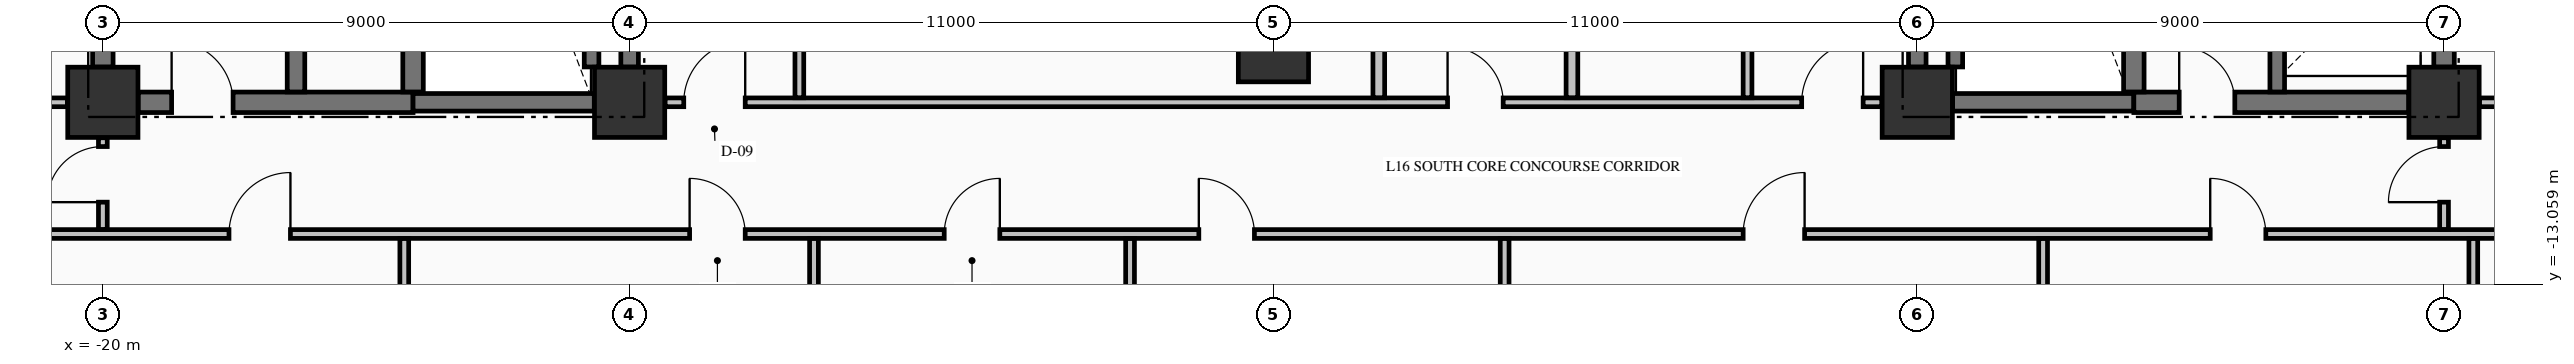
"""IFC4 building model, lengths in metres.
Left out: names, types, materials, properties, quantities, classifications, styles, units other than length and angle.
Written with IfcOpenShell. Run it as: python <this file> out.ifc"""

import sys

from ifc_helpers import new_model, si_unit, direction, frame, frame_2d, origin, origin_2d, place, context, subcontext, project, spatial, rectangle, extrude, element, fill, save


model = new_model("IFC4")
c1 = context("Model", 3, precision=1e-05, world=origin(), true_north=direction((0.0, 1.0)))
c2 = subcontext(c1, "Body", "Model", "MODEL_VIEW")
j1 = project(units=[si_unit("LENGTHUNIT", "METRE"), si_unit("PLANEANGLEUNIT", "RADIAN")], contexts=[c1])
p1 = place(None, origin())
s1 = spatial("IfcSite", under=j1, at=p1, CompositionType="ELEMENT")
p2 = place(p1, origin())
s2 = spatial("IfcBuilding", under=s1, at=p2, CompositionType="ELEMENT")
p3 = place(p2, frame((0.0, 0.0, 67.9)))
s3 = spatial("IfcBuildingStorey", under=s2, at=p3, CompositionType="ELEMENT", Elevation=67.9)
for number, where, z_axis, x_axis in (
    (1, (-20.0, -9.95, -0.25), (0.0, 0.0, 1.0), (1.0, 0.0, 0.0)),
    (2, (-11.0, -9.95, -0.25), (0.0, 0.0, 1.0), (1.0, 0.0, 0.0)),
    (3, (11.0, -9.95, -0.25), (0.0, 0.0, 1.0), (1.0, 0.0, 0.0)),
    (4, (20.0, -9.95, -0.25), (0.0, 0.0, 1.0), (1.0, 0.0, 0.0)),
    (5, (0.0, -9.0, -0.25), (0.0, 0.0, 1.0), (1.0, 0.0, 0.0)),
):
    element("IfcColumn", number, at=place(p3, frame(where, z_axis=z_axis, x_axis=x_axis)), inside=s3, PredefinedType="COLUMN", context=c2, shape_type="SweptSolid", body=[
        extrude(rectangle(XDim=1.2, YDim=1.2, at=origin_2d()), origin(), (0.0, 0.0, 1.0), 3.495),
    ])
p4 = place(p3, frame((-19.396, -9.95, 0.0), z_axis=(0.0, 0.0, 1.0), x_axis=(1.0, 0.0, 0.0)))
e6 = element("IfcWall", 6, at=p4, inside=s3, PredefinedType="SHEAR", context=c2, shape_type="SweptSolid", body=[
    extrude(rectangle(XDim=4.696, YDim=0.35, at=frame_2d((2.348, 0.0))), origin(), (0.0, 0.0, 1.0), 3.245),
])
p5 = place(p4, frame((0.571, 0.0, 0.0)))
e7 = element("IfcOpeningElement", 7, at=p5, cuts=e6, PredefinedType="OPENING", context=c2, shape_type="SweptSolid", body=[
    extrude(rectangle(XDim=1.05, YDim=2.15, at=frame_2d((0.525, 1.075))), frame((0.0, 0.185, 0.0), z_axis=(0.0, -1.0, 0.0), x_axis=(1.0, 0.0, 0.0)), (0.0, 0.0, 1.0), 0.37),
])
for number, where, z_axis, x_axis in (
    (8, (-14.7, -9.95, 0.0), (0.0, 0.0, 1.0), (1.0, 0.0, 0.0)),
    (9, (11.604, -9.95, 0.0), (0.0, 0.0, 1.0), (1.0, 0.0, 0.0)),
):
    element("IfcWall", number, at=place(p3, frame(where, z_axis=z_axis, x_axis=x_axis)), inside=s3, PredefinedType="SHEAR", context=c2, shape_type="SweptSolid", body=[
        extrude(rectangle(XDim=3.096, YDim=0.3, at=frame_2d((1.548, 0.0))), origin(), (0.0, 0.0, 1.0), 3.245),
    ])
p6 = place(p3, frame((14.7, -9.95, 0.0), z_axis=(0.0, 0.0, 1.0), x_axis=(1.0, 0.0, 0.0)))
e10 = element("IfcWall", 10, at=p6, inside=s3, PredefinedType="SHEAR", context=c2, shape_type="SweptSolid", body=[
    extrude(rectangle(XDim=4.696, YDim=0.35, at=frame_2d((2.348, 0.0))), origin(), (0.0, 0.0, 1.0), 3.245),
])
p7 = place(p6, frame((0.775, 0.0, 0.0)))
e11 = element("IfcOpeningElement", 11, at=p7, cuts=e10, PredefinedType="OPENING", context=c2, shape_type="SweptSolid", body=[
    extrude(rectangle(XDim=0.95, YDim=2.15, at=frame_2d((0.475, 1.075))), frame((0.0, 0.185, 0.0), z_axis=(0.0, -1.0, 0.0), x_axis=(1.0, 0.0, 0.0)), (0.0, 0.0, 1.0), 0.37),
])
p8 = place(p3, frame((-28.835, -12.2, 0.0), z_axis=(0.0, 0.0, 1.0), x_axis=(1.0, 0.0, 0.0)))
e12 = element("IfcWall", 12, at=p8, inside=s3, PredefinedType="PARTITIONING", context=c2, shape_type="SweptSolid", body=[
    extrude(rectangle(XDim=52.67, YDim=0.15, at=frame_2d((26.335, 0.0))), origin(), (0.0, 0.0, 1.0), 3.245),
])
p9 = place(p8, frame((10.99, 0.0, 0.0)))
e13 = element("IfcOpeningElement", 13, at=p9, cuts=e12, PredefinedType="OPENING", context=c2, shape_type="SweptSolid", body=[
    extrude(rectangle(XDim=1.05, YDim=2.15, at=frame_2d((0.525, 1.075))), frame((0.0, 0.085, 0.0), z_axis=(0.0, -1.0, 0.0), x_axis=(1.0, 0.0, 0.0)), (0.0, 0.0, 1.0), 0.17),
])
p10 = place(p8, frame((18.86, 0.0, 0.0)))
e14 = element("IfcOpeningElement", 14, at=p10, cuts=e12, PredefinedType="OPENING", context=c2, shape_type="SweptSolid", body=[
    extrude(rectangle(XDim=0.95, YDim=2.15, at=frame_2d((0.475, 1.075))), frame((0.0, 0.085, 0.0), z_axis=(0.0, -1.0, 0.0), x_axis=(1.0, 0.0, 0.0)), (0.0, 0.0, 1.0), 0.17),
])
p11 = place(p8, frame((23.21, 0.0, 0.0)))
e15 = element("IfcOpeningElement", 15, at=p11, cuts=e12, PredefinedType="OPENING", context=c2, shape_type="SweptSolid", body=[
    extrude(rectangle(XDim=0.95, YDim=2.15, at=frame_2d((0.475, 1.075))), frame((0.0, 0.085, 0.0), z_axis=(0.0, -1.0, 0.0), x_axis=(1.0, 0.0, 0.0)), (0.0, 0.0, 1.0), 0.17),
])
p12 = place(p8, frame((27.56, 0.0, 0.0)))
e16 = element("IfcOpeningElement", 16, at=p12, cuts=e12, PredefinedType="OPENING", context=c2, shape_type="SweptSolid", body=[
    extrude(rectangle(XDim=0.95, YDim=2.15, at=frame_2d((0.475, 1.075))), frame((0.0, 0.085, 0.0), z_axis=(0.0, -1.0, 0.0), x_axis=(1.0, 0.0, 0.0)), (0.0, 0.0, 1.0), 0.17),
])
p13 = place(p8, frame((36.86, 0.0, 0.0)))
e17 = element("IfcOpeningElement", 17, at=p13, cuts=e12, PredefinedType="OPENING", context=c2, shape_type="SweptSolid", body=[
    extrude(rectangle(XDim=1.05, YDim=2.15, at=frame_2d((0.525, 1.075))), frame((0.0, 0.085, 0.0), z_axis=(0.0, -1.0, 0.0), x_axis=(1.0, 0.0, 0.0)), (0.0, 0.0, 1.0), 0.17),
])
p14 = place(p8, frame((44.84, 0.0, 0.0)))
e18 = element("IfcOpeningElement", 18, at=p14, cuts=e12, PredefinedType="OPENING", context=c2, shape_type="SweptSolid", body=[
    extrude(rectangle(XDim=0.95, YDim=2.15, at=frame_2d((0.475, 1.075))), frame((0.0, 0.085, 0.0), z_axis=(0.0, -1.0, 0.0), x_axis=(1.0, 0.0, 0.0)), (0.0, 0.0, 1.0), 0.17),
])
p15 = place(p3, frame((-28.835, -9.95, 0.0), z_axis=(0.0, 0.0, 1.0), x_axis=(1.0, 0.0, 0.0)))
e19 = element("IfcWall", 19, at=p15, inside=s3, PredefinedType="PARTITIONING", context=c2, shape_type="SweptSolid", body=[
    extrude(rectangle(XDim=8.229, YDim=0.15, at=frame_2d((4.115, 0.0))), origin(), (0.0, 0.0, 1.0), 3.245),
])
p16 = place(p15, frame((3.835, 0.0, 0.0)))
e20 = element("IfcOpeningElement", 20, at=p16, cuts=e19, PredefinedType="OPENING", context=c2, shape_type="SweptSolid", body=[
    extrude(rectangle(XDim=1.0, YDim=2.15, at=frame_2d((0.5, 1.075))), frame((0.0, 0.085, 0.0), z_axis=(0.0, -1.0, 0.0), x_axis=(1.0, 0.0, 0.0)), (0.0, 0.0, 1.0), 0.17),
])
p17 = place(p3, frame((-10.394, -9.95, 0.0), z_axis=(0.0, 0.0, 1.0), x_axis=(1.0, 0.0, 0.0)))
e21 = element("IfcWall", 21, at=p17, inside=s3, PredefinedType="PARTITIONING", context=c2, shape_type="SweptSolid", body=[
    extrude(rectangle(XDim=20.788, YDim=0.15, at=frame_2d((10.394, 0.0))), origin(), (0.0, 0.0, 1.0), 3.245),
])
p18 = place(p17, frame((0.319, 0.0, 0.0)))
e22 = element("IfcOpeningElement", 22, at=p18, cuts=e21, PredefinedType="OPENING", context=c2, shape_type="SweptSolid", body=[
    extrude(rectangle(XDim=1.05, YDim=2.15, at=frame_2d((0.525, 1.075))), frame((0.0, 0.085, 0.0), z_axis=(0.0, -1.0, 0.0), x_axis=(1.0, 0.0, 0.0)), (0.0, 0.0, 1.0), 0.17),
])
p19 = place(p17, frame((19.419, 0.0, 0.0)))
e23 = element("IfcOpeningElement", 23, at=p19, cuts=e21, PredefinedType="OPENING", context=c2, shape_type="SweptSolid", body=[
    extrude(rectangle(XDim=1.05, YDim=2.15, at=frame_2d((0.525, 1.075))), frame((0.0, 0.085, 0.0), z_axis=(0.0, -1.0, 0.0), x_axis=(1.0, 0.0, 0.0)), (0.0, 0.0, 1.0), 0.17),
])
p20 = place(p17, frame((13.369, 0.0, 0.0)))
e24 = element("IfcOpeningElement", 24, at=p20, cuts=e21, PredefinedType="OPENING", context=c2, shape_type="SweptSolid", body=[
    extrude(rectangle(XDim=0.95, YDim=2.15, at=frame_2d((0.475, 1.075))), frame((0.0, 0.085, 0.0), z_axis=(0.0, -1.0, 0.0), x_axis=(1.0, 0.0, 0.0)), (0.0, 0.0, 1.0), 0.17),
])
p21 = place(p3, frame((20.606, -9.95, 0.0), z_axis=(0.0, 0.0, 1.0), x_axis=(1.0, 0.0, 0.0)))
e25 = element("IfcWall", 25, at=p21, inside=s3, PredefinedType="PARTITIONING", context=c2, shape_type="SweptSolid", body=[
    extrude(rectangle(XDim=3.229, YDim=0.15, at=frame_2d((1.615, 0.0))), origin(), (0.0, 0.0, 1.0), 3.245),
])
p22 = place(p21, frame((0.919, 0.0, 0.0)))
e26 = element("IfcOpeningElement", 26, at=p22, cuts=e25, PredefinedType="OPENING", context=c2, shape_type="SweptSolid", body=[
    extrude(rectangle(XDim=0.95, YDim=2.15, at=frame_2d((0.475, 1.075))), frame((0.0, 0.085, 0.0), z_axis=(0.0, -1.0, 0.0), x_axis=(1.0, 0.0, 0.0)), (0.0, 0.0, 1.0), 0.17),
])
p23 = place(p3, frame((-20.0, -9.346, 0.0), z_axis=(0.0, 0.0, 1.0), x_axis=(0.0, 1.0, 0.0)))
e27 = element("IfcWall", 27, at=p23, inside=s3, PredefinedType="SHEAR", context=c2, shape_type="SweptSolid", body=[
    extrude(rectangle(XDim=8.742, YDim=0.35, at=frame_2d((4.371, 0.0))), origin(), (0.0, 0.0, 1.0), 3.245),
])
p24 = place(p3, frame((-16.7, -9.773, 0.0), z_axis=(0.0, 0.0, 1.0), x_axis=(0.0, 1.0, 0.0)))
e28 = element("IfcWall", 28, at=p24, inside=s3, PredefinedType="SHEAR", context=c2, shape_type="SweptSolid", body=[
    extrude(rectangle(XDim=9.371, YDim=0.3, at=frame_2d((4.686, 0.0))), origin(), (0.0, 0.0, 1.0), 3.245),
])
p25 = place(p3, frame((-14.7, -9.773, 0.0), z_axis=(0.0, 0.0, 1.0), x_axis=(0.0, 1.0, 0.0)))
e29 = element("IfcWall", 29, at=p25, inside=s3, PredefinedType="SHEAR", context=c2, shape_type="SweptSolid", body=[
    extrude(rectangle(XDim=9.371, YDim=0.35, at=frame_2d((4.686, 0.0))), origin(), (0.0, 0.0, 1.0), 3.245),
])
p26 = place(p3, frame((-11.65, -9.346, 0.0), z_axis=(0.0, 0.0, 1.0), x_axis=(0.0, 1.0, 0.0)))
e30 = element("IfcWall", 30, at=p26, inside=s3, PredefinedType="SOLIDWALL", context=c2, shape_type="SweptSolid", body=[
    extrude(rectangle(XDim=8.742, YDim=0.25, at=frame_2d((4.371, 0.0))), origin(), (0.0, 0.0, 1.0), 3.245),
])
for number, where, z_axis, x_axis in (
    (31, (-11.0, -9.346, 0.0), (0.0, 0.0, 1.0), (0.0, 1.0, 0.0)),
    (32, (11.0, -9.346, 0.0), (0.0, 0.0, 1.0), (0.0, 1.0, 0.0)),
):
    element("IfcWall", number, at=place(p3, frame(where, z_axis=z_axis, x_axis=x_axis)), inside=s3, PredefinedType="SHEAR", context=c2, shape_type="SweptSolid", body=[
        extrude(rectangle(XDim=8.742, YDim=0.3, at=frame_2d((4.371, 0.0))), origin(), (0.0, 0.0, 1.0), 3.245),
    ])
p27 = place(p3, frame((11.65, -9.346, 0.0), z_axis=(0.0, 0.0, 1.0), x_axis=(0.0, 1.0, 0.0)))
e33 = element("IfcWall", 33, at=p27, inside=s3, PredefinedType="SOLIDWALL", context=c2, shape_type="SweptSolid", body=[
    extrude(rectangle(XDim=8.742, YDim=0.25, at=frame_2d((4.371, 0.0))), origin(), (0.0, 0.0, 1.0), 3.245),
])
p28 = place(p3, frame((14.7, -9.773, 0.0), z_axis=(0.0, 0.0, 1.0), x_axis=(0.0, 1.0, 0.0)))
e34 = element("IfcWall", 34, at=p28, inside=s3, PredefinedType="SHEAR", context=c2, shape_type="SweptSolid", body=[
    extrude(rectangle(XDim=9.371, YDim=0.35, at=frame_2d((4.686, 0.0))), origin(), (0.0, 0.0, 1.0), 3.245),
])
p29 = place(p3, frame((17.15, -9.773, 0.0), z_axis=(0.0, 0.0, 1.0), x_axis=(0.0, 1.0, 0.0)))
e35 = element("IfcWall", 35, at=p29, inside=s3, PredefinedType="SOLIDWALL", context=c2, shape_type="SweptSolid", body=[
    extrude(rectangle(XDim=2.596, YDim=0.25, at=frame_2d((1.298, 0.0))), origin(), (0.0, 0.0, 1.0), 3.245),
])
p30 = place(p3, frame((20.0, -9.346, 0.0), z_axis=(0.0, 0.0, 1.0), x_axis=(0.0, 1.0, 0.0)))
e36 = element("IfcWall", 36, at=p30, inside=s3, PredefinedType="SHEAR", context=c2, shape_type="SweptSolid", body=[
    extrude(rectangle(XDim=2.169, YDim=0.35, at=frame_2d((1.084, 0.0))), origin(), (0.0, 0.0, 1.0), 3.245),
])
p31 = place(p3, frame((-20.0, -12.122, 0.0), z_axis=(0.0, 0.0, 1.0), x_axis=(0.0, 1.0, 0.0)))
e37 = element("IfcWall", 37, at=p31, inside=s3, PredefinedType="PARTITIONING", context=c2, shape_type="SweptSolid", body=[
    extrude(rectangle(XDim=1.566, YDim=0.15, at=frame_2d((0.783, 0.0))), origin(), (0.0, 0.0, 1.0), 2.585),
])
p32 = place(p31, frame((0.466, 0.0, 0.0)))
e38 = element("IfcOpeningElement", 38, at=p32, cuts=e37, PredefinedType="OPENING", context=c2, shape_type="SweptSolid", body=[
    extrude(rectangle(XDim=0.95, YDim=2.15, at=frame_2d((0.475, 1.075))), frame((0.0, 0.085, 0.0), z_axis=(0.0, -1.0, 0.0), x_axis=(1.0, 0.0, 0.0)), (0.0, 0.0, 1.0), 0.17),
])
p33 = place(p3, frame((-14.85, -26.335, 0.0), z_axis=(0.0, 0.0, 1.0), x_axis=(0.0, 1.0, 0.0)))
e39 = element("IfcWall", 39, at=p33, inside=s3, PredefinedType="PARTITIONING", context=c2, shape_type="SweptSolid", body=[
    extrude(rectangle(XDim=14.057, YDim=0.15, at=frame_2d((7.028, 0.0))), origin(), (0.0, 0.0, 1.0), 3.245),
])
p34 = place(p3, frame((-8.1, -9.872, 0.0), z_axis=(0.0, 0.0, 1.0), x_axis=(0.0, 1.0, 0.0)))
e40 = element("IfcWall", 40, at=p34, inside=s3, PredefinedType="PARTITIONING", context=c2, shape_type="SweptSolid", body=[
    extrude(rectangle(XDim=5.769, YDim=0.15, at=frame_2d((2.885, 0.0))), origin(), (0.0, 0.0, 1.0), 3.245),
])
p35 = place(p34, frame((2.427, 0.0, 0.0)))
e41 = element("IfcOpeningElement", 41, at=p35, cuts=e40, PredefinedType="OPENING", context=c2, shape_type="SweptSolid", body=[
    extrude(rectangle(XDim=0.95, YDim=2.15, at=frame_2d((0.475, 1.075))), frame((0.0, 0.085, 0.0), z_axis=(0.0, -1.0, 0.0), x_axis=(1.0, 0.0, 0.0)), (0.0, 0.0, 1.0), 0.17),
])
for number, where, z_axis, x_axis in (
    (42, (-7.85, -26.335, 0.0), (0.0, 0.0, 1.0), (0.0, 1.0, 0.0)),
    (43, (-2.45, -26.335, 0.0), (0.0, 0.0, 1.0), (0.0, 1.0, 0.0)),
):
    element("IfcWall", number, at=place(p3, frame(where, z_axis=z_axis, x_axis=x_axis)), inside=s3, PredefinedType="PARTITIONING", context=c2, shape_type="SweptSolid", body=[
        extrude(rectangle(XDim=14.057, YDim=0.15, at=frame_2d((7.028, 0.0))), origin(), (0.0, 0.0, 1.0), 3.245),
    ])
p36 = place(p3, frame((1.8, -9.872, 0.0), z_axis=(0.0, 0.0, 1.0), x_axis=(0.0, 1.0, 0.0)))
e44 = element("IfcWall", 44, at=p36, inside=s3, PredefinedType="PARTITIONING", context=c2, shape_type="SweptSolid", body=[
    extrude(rectangle(XDim=4.969, YDim=0.2, at=frame_2d((2.484, 0.0))), origin(), (0.0, 0.0, 1.0), 3.245),
])
p37 = place(p3, frame((3.95, -26.335, 0.0), z_axis=(0.0, 0.0, 1.0), x_axis=(0.0, 1.0, 0.0)))
e45 = element("IfcWall", 45, at=p37, inside=s3, PredefinedType="PARTITIONING", context=c2, shape_type="SweptSolid", body=[
    extrude(rectangle(XDim=14.057, YDim=0.15, at=frame_2d((7.028, 0.0))), origin(), (0.0, 0.0, 1.0), 3.245),
])
p38 = place(p3, frame((5.1, -9.872, 0.0), z_axis=(0.0, 0.0, 1.0), x_axis=(0.0, 1.0, 0.0)))
e46 = element("IfcWall", 46, at=p38, inside=s3, PredefinedType="PARTITIONING", context=c2, shape_type="SweptSolid", body=[
    extrude(rectangle(XDim=4.969, YDim=0.2, at=frame_2d((2.484, 0.0))), origin(), (0.0, 0.0, 1.0), 3.245),
])
p39 = place(p3, frame((8.1, -9.872, 0.0), z_axis=(0.0, 0.0, 1.0), x_axis=(0.0, 1.0, 0.0)))
e47 = element("IfcWall", 47, at=p39, inside=s3, PredefinedType="PARTITIONING", context=c2, shape_type="SweptSolid", body=[
    extrude(rectangle(XDim=4.969, YDim=0.15, at=frame_2d((2.484, 0.0))), origin(), (0.0, 0.0, 1.0), 3.245),
])
p40 = place(p39, frame((1.997, 0.0, 0.0)))
e48 = element("IfcOpeningElement", 48, at=p40, cuts=e47, PredefinedType="OPENING", context=c2, shape_type="SweptSolid", body=[
    extrude(rectangle(XDim=0.95, YDim=2.15, at=frame_2d((0.475, 1.075))), frame((0.0, 0.085, 0.0), z_axis=(0.0, -1.0, 0.0), x_axis=(1.0, 0.0, 0.0)), (0.0, 0.0, 1.0), 0.17),
])
p41 = place(p3, frame((13.15, -26.335, 0.0), z_axis=(0.0, 0.0, 1.0), x_axis=(0.0, 1.0, 0.0)))
e49 = element("IfcWall", 49, at=p41, inside=s3, PredefinedType="PARTITIONING", context=c2, shape_type="SweptSolid", body=[
    extrude(rectangle(XDim=14.057, YDim=0.15, at=frame_2d((7.028, 0.0))), origin(), (0.0, 0.0, 1.0), 3.245),
])
p42 = place(p3, frame((20.0, -12.122, 0.0), z_axis=(0.0, 0.0, 1.0), x_axis=(0.0, 1.0, 0.0)))
e50 = element("IfcWall", 50, at=p42, inside=s3, PredefinedType="PARTITIONING", context=c2, shape_type="SweptSolid", body=[
    extrude(rectangle(XDim=1.566, YDim=0.15, at=frame_2d((0.783, 0.0))), origin(), (0.0, 0.0, 1.0), 3.245),
])
p43 = place(p42, frame((0.466, 0.0, 0.0)))
e51 = element("IfcOpeningElement", 51, at=p43, cuts=e50, PredefinedType="OPENING", context=c2, shape_type="SweptSolid", body=[
    extrude(rectangle(XDim=0.95, YDim=2.15, at=frame_2d((0.475, 1.075))), frame((0.0, 0.085, 0.0), z_axis=(0.0, -1.0, 0.0), x_axis=(1.0, 0.0, 0.0)), (0.0, 0.0, 1.0), 0.17),
])
p44 = place(p3, frame((20.5, -22.294, 0.0), z_axis=(0.0, 0.0, 1.0), x_axis=(0.0, 1.0, 0.0)))
e52 = element("IfcWall", 52, at=p44, inside=s3, PredefinedType="PARTITIONING", context=c2, shape_type="SweptSolid", body=[
    extrude(rectangle(XDim=10.016, YDim=0.15, at=frame_2d((5.008, 0.0))), origin(), (0.0, 0.0, 1.0), 3.245),
])
p45 = place(p5, origin())
e53 = element("IfcDoor", 53, at=p45, inside=s3, OperationType="SINGLE_SWING_LEFT", PredefinedType="DOOR", context=c2, shape_type="SweptSolid", body=[
    extrude(rectangle(XDim=1.05, YDim=2.15, at=frame_2d((0.525, 1.075))), frame((0.0, 0.025, 0.0), z_axis=(0.0, -1.0, 0.0), x_axis=(1.0, 0.0, 0.0)), (0.0, 0.0, 1.0), 0.05),
])
fill(e7, e53)
p46 = place(p7, origin())
e54 = element("IfcDoor", 54, at=p46, inside=s3, OperationType="SINGLE_SWING_LEFT", PredefinedType="DOOR", context=c2, shape_type="SweptSolid", body=[
    extrude(rectangle(XDim=0.95, YDim=2.15, at=frame_2d((0.475, 1.075))), frame((0.0, 0.025, 0.0), z_axis=(0.0, -1.0, 0.0), x_axis=(1.0, 0.0, 0.0)), (0.0, 0.0, 1.0), 0.05),
])
fill(e11, e54)
p47 = place(p18, origin())
e55 = element("IfcDoor", 55, at=p47, inside=s3, OperationType="SINGLE_SWING_RIGHT", PredefinedType="DOOR", context=c2, shape_type="SweptSolid", body=[
    extrude(rectangle(XDim=1.05, YDim=2.15, at=frame_2d((0.525, 1.075))), frame((0.0, 0.025, 0.0), z_axis=(0.0, -1.0, 0.0), x_axis=(1.0, 0.0, 0.0)), (0.0, 0.0, 1.0), 0.05),
])
fill(e22, e55)
p48 = place(p19, origin())
e56 = element("IfcDoor", 56, at=p48, inside=s3, OperationType="SINGLE_SWING_RIGHT", PredefinedType="DOOR", context=c2, shape_type="SweptSolid", body=[
    extrude(rectangle(XDim=1.05, YDim=2.15, at=frame_2d((0.525, 1.075))), frame((0.0, 0.025, 0.0), z_axis=(0.0, -1.0, 0.0), x_axis=(1.0, 0.0, 0.0)), (0.0, 0.0, 1.0), 0.05),
])
fill(e23, e56)
p49 = place(p9, origin())
e57 = element("IfcDoor", 57, at=p49, inside=s3, OperationType="SINGLE_SWING_RIGHT", PredefinedType="DOOR", context=c2, shape_type="SweptSolid", body=[
    extrude(rectangle(XDim=1.05, YDim=2.15, at=frame_2d((0.525, 1.075))), frame((0.0, 0.025, 0.0), z_axis=(0.0, -1.0, 0.0), x_axis=(1.0, 0.0, 0.0)), (0.0, 0.0, 1.0), 0.05),
])
fill(e13, e57)
p50 = place(p10, origin())
e58 = element("IfcDoor", 58, at=p50, inside=s3, OperationType="SINGLE_SWING_LEFT", PredefinedType="DOOR", context=c2, shape_type="SweptSolid", body=[
    extrude(rectangle(XDim=0.95, YDim=2.15, at=frame_2d((0.475, 1.075))), frame((0.0, 0.025, 0.0), z_axis=(0.0, -1.0, 0.0), x_axis=(1.0, 0.0, 0.0)), (0.0, 0.0, 1.0), 0.05),
])
fill(e14, e58)
p51 = place(p11, origin())
e59 = element("IfcDoor", 59, at=p51, inside=s3, OperationType="SINGLE_SWING_RIGHT", PredefinedType="DOOR", context=c2, shape_type="SweptSolid", body=[
    extrude(rectangle(XDim=0.95, YDim=2.15, at=frame_2d((0.475, 1.075))), frame((0.0, 0.025, 0.0), z_axis=(0.0, -1.0, 0.0), x_axis=(1.0, 0.0, 0.0)), (0.0, 0.0, 1.0), 0.05),
])
fill(e15, e59)
p52 = place(p12, origin())
e60 = element("IfcDoor", 60, at=p52, inside=s3, OperationType="SINGLE_SWING_LEFT", PredefinedType="DOOR", context=c2, shape_type="SweptSolid", body=[
    extrude(rectangle(XDim=0.95, YDim=2.15, at=frame_2d((0.475, 1.075))), frame((0.0, 0.025, 0.0), z_axis=(0.0, -1.0, 0.0), x_axis=(1.0, 0.0, 0.0)), (0.0, 0.0, 1.0), 0.05),
])
fill(e16, e60)
p53 = place(p13, origin())
e61 = element("IfcDoor", 61, at=p53, inside=s3, OperationType="SINGLE_SWING_RIGHT", PredefinedType="DOOR", context=c2, shape_type="SweptSolid", body=[
    extrude(rectangle(XDim=1.05, YDim=2.15, at=frame_2d((0.525, 1.075))), frame((0.0, 0.025, 0.0), z_axis=(0.0, -1.0, 0.0), x_axis=(1.0, 0.0, 0.0)), (0.0, 0.0, 1.0), 0.05),
])
fill(e17, e61)
p54 = place(p14, origin())
e62 = element("IfcDoor", 62, at=p54, inside=s3, OperationType="SINGLE_SWING_LEFT", PredefinedType="DOOR", context=c2, shape_type="SweptSolid", body=[
    extrude(rectangle(XDim=0.95, YDim=2.15, at=frame_2d((0.475, 1.075))), frame((0.0, 0.025, 0.0), z_axis=(0.0, -1.0, 0.0), x_axis=(1.0, 0.0, 0.0)), (0.0, 0.0, 1.0), 0.05),
])
fill(e18, e62)
p55 = place(p20, origin())
e63 = element("IfcDoor", 63, at=p55, inside=s3, OperationType="SINGLE_SWING_LEFT", PredefinedType="DOOR", context=c2, shape_type="SweptSolid", body=[
    extrude(rectangle(XDim=0.95, YDim=2.15, at=frame_2d((0.475, 1.075))), frame((0.0, 0.025, 0.0), z_axis=(0.0, -1.0, 0.0), x_axis=(1.0, 0.0, 0.0)), (0.0, 0.0, 1.0), 0.05),
])
fill(e24, e63)
p56 = place(p32, origin())
e64 = element("IfcDoor", 64, at=p56, inside=s3, OperationType="SINGLE_SWING_LEFT", PredefinedType="DOOR", context=c2, shape_type="SweptSolid", body=[
    extrude(rectangle(XDim=0.95, YDim=2.15, at=frame_2d((0.475, 1.075))), frame((0.0, 0.025, 0.0), z_axis=(0.0, -1.0, 0.0), x_axis=(1.0, 0.0, 0.0)), (0.0, 0.0, 1.0), 0.05),
])
fill(e38, e64)
p57 = place(p43, origin())
e65 = element("IfcDoor", 65, at=p57, inside=s3, OperationType="SINGLE_SWING_LEFT", PredefinedType="DOOR", context=c2, shape_type="SweptSolid", body=[
    extrude(rectangle(XDim=0.95, YDim=2.15, at=frame_2d((0.475, 1.075))), frame((0.0, 0.025, 0.0), z_axis=(0.0, -1.0, 0.0), x_axis=(1.0, 0.0, 0.0)), (0.0, 0.0, 1.0), 0.05),
])
fill(e51, e65)
save(model, sys.argv[1])
